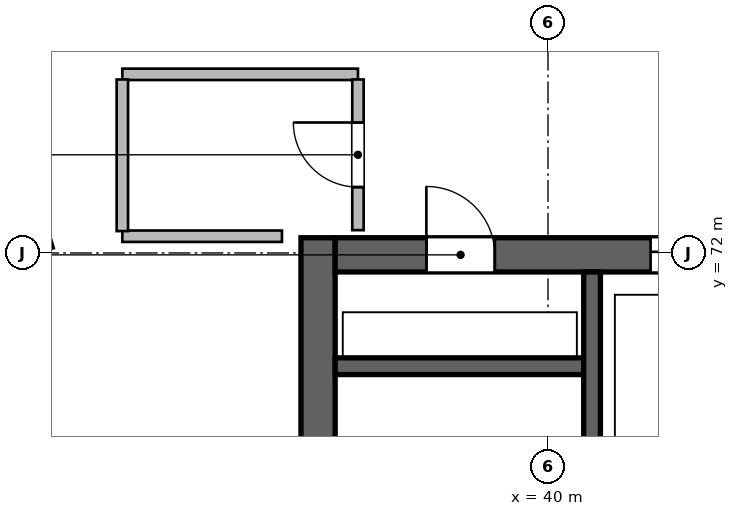
"""IFC4 building model, lengths in metres.
Left out: names, types, materials, properties, quantities, classifications, styles, units other than length and angle.
Written with IfcOpenShell. Run it as: python <this file> out.ifc"""

import sys

from ifc_helpers import new_model, si_unit, direction, frame, frame_2d, origin, origin_2d, place, context, subcontext, project, spatial, rectangle, extrude, source, transform, mapped, element, fill, save


model = new_model("IFC4")
c1 = context("Model", 3, precision=1e-05, world=origin(), true_north=direction((0.0, 1.0)))
c2 = subcontext(c1, "Body", "Model", "MODEL_VIEW")
j1 = project(units=[si_unit("LENGTHUNIT", "METRE"), si_unit("PLANEANGLEUNIT", "RADIAN")], contexts=[c1])
p1 = place(None, origin())
s1 = spatial("IfcSite", under=j1, at=p1, CompositionType="ELEMENT")
p2 = place(p1, origin())
s2 = spatial("IfcBuilding", under=s1, at=p2, CompositionType="ELEMENT")
p3 = place(p2, frame((0.0, 0.0, 189.6)))
s3 = spatial("IfcBuildingStorey", under=s2, at=p3, CompositionType="ELEMENT", Elevation=189.6)
m1 = source(origin(), c2, "Body", "SweptSolid", [
    extrude(rectangle(XDim=12.0, YDim=0.45, at=frame_2d((6.0, 0.0))), origin(), (0.0, 0.0, 1.0), 4.8),
])
p4 = place(p3, frame((36.975, 60.2, 0.0), z_axis=(0.0, 0.0, 1.0), x_axis=(0.0, 1.0, 0.0)))
e1 = element("IfcWall", 1, at=p4, inside=s3, PredefinedType="SHEAR", context=c2, shape_type="MappedRepresentation", body=[
    mapped(m1, transform((0.0, 0.0, 0.0), scale=1.0)),
])
m2 = source(origin(), c2, "Body", "SweptSolid", [
    extrude(rectangle(XDim=21.6, YDim=0.45, at=frame_2d((10.8, 0.0))), origin(), (0.0, 0.0, 1.0), 4.8),
])
p5 = place(p3, frame((37.2, 71.975, 0.0), z_axis=(0.0, 0.0, 1.0), x_axis=(1.0, 0.0, 0.0)))
e2 = element("IfcWall", 2, at=p5, inside=s3, PredefinedType="SHEAR", context=c2, shape_type="MappedRepresentation", body=[
    mapped(m2, transform((0.0, 0.0, 0.0), scale=1.0)),
])
p6 = place(p5, frame((1.2, 0.0, 0.0)))
e3 = element("IfcOpeningElement", 3, at=p6, cuts=e2, PredefinedType="OPENING", context=c2, shape_type="SweptSolid", body=[
    extrude(rectangle(XDim=0.9, YDim=2.1, at=frame_2d((0.45, 1.05))), frame((0.0, 0.235, 0.0), z_axis=(0.0, -1.0, 0.0), x_axis=(1.0, 0.0, 0.0)), (0.0, 0.0, 1.0), 0.47),
])
p7 = place(p5, frame((14.7, 0.0, 0.0)))
e4 = element("IfcOpeningElement", 4, at=p7, cuts=e2, PredefinedType="OPENING", context=c2, shape_type="SweptSolid", body=[
    extrude(rectangle(XDim=1.2, YDim=2.15, at=frame_2d((0.6, 1.075))), frame((0.0, 0.235, 0.0), z_axis=(0.0, -1.0, 0.0), x_axis=(1.0, 0.0, 0.0)), (0.0, 0.0, 1.0), 0.47),
])
p8 = place(p5, frame((4.15, 0.0, 0.0)))
e5 = element("IfcOpeningElement", 5, at=p8, cuts=e2, PredefinedType="OPENING", context=c2, shape_type="SweptSolid", body=[
    extrude(rectangle(XDim=1.3, YDim=2.15, at=frame_2d((0.65, 1.075))), frame((0.0, 0.235, 0.0), z_axis=(0.0, -1.0, 0.0), x_axis=(1.0, 0.0, 0.0)), (0.0, 0.0, 1.0), 0.47),
])
p9 = place(p5, frame((7.1, 0.0, 0.0)))
e6 = element("IfcOpeningElement", 6, at=p9, cuts=e2, PredefinedType="OPENING", context=c2, shape_type="SweptSolid", body=[
    extrude(rectangle(XDim=0.9, YDim=2.1, at=frame_2d((0.45, 1.05))), frame((0.0, 0.235, 0.0), z_axis=(0.0, -1.0, 0.0), x_axis=(1.0, 0.0, 0.0)), (0.0, 0.0, 1.0), 0.47),
])
m3 = source(origin(), c2, "Body", "SweptSolid", [
    extrude(rectangle(XDim=3.27, YDim=0.22, at=frame_2d((1.635, 0.0))), origin(), (0.0, 0.0, 1.0), 4.8),
])
p10 = place(p3, frame((37.2, 70.51, 0.0), z_axis=(0.0, 0.0, 1.0), x_axis=(1.0, 0.0, 0.0)))
e7 = element("IfcWall", 7, at=p10, inside=s3, PredefinedType="SHEAR", context=c2, shape_type="MappedRepresentation", body=[
    mapped(m3, transform((0.0, 0.0, 0.0), scale=1.0)),
])
m4 = source(origin(), c2, "Body", "SweptSolid", [
    extrude(rectangle(XDim=11.1, YDim=0.22, at=frame_2d((5.55, 0.0))), origin(), (0.0, 0.0, 1.0), 4.8),
])
p11 = place(p3, frame((40.58, 60.65, 0.0), z_axis=(0.0, 0.0, 1.0), x_axis=(0.0, 1.0, 0.0)))
e8 = element("IfcWall", 8, at=p11, inside=s3, PredefinedType="SHEAR", context=c2, shape_type="MappedRepresentation", body=[
    mapped(m4, transform((0.0, 0.0, 0.0), scale=1.0)),
])
m5 = source(origin(), c2, "Body", "SweptSolid", [
    extrude(rectangle(XDim=1.1, YDim=1.1, at=origin_2d()), origin(), (0.0, 0.0, 1.0), 4.8),
])
p12 = place(p3, frame((32.791, 72.442, 0.0), z_axis=(0.0, 0.0, 1.0), x_axis=(-0.288697611798, 0.957420330337, 0.0)))
e9 = element("IfcColumn", 9, at=p12, inside=s3, PredefinedType="COLUMN", context=c2, shape_type="MappedRepresentation", body=[
    mapped(m5, transform((0.0, 0.0, 0.0), scale=1.0)),
])
m6 = source(origin(), c2, "Body", "SweptSolid", [
    extrude(rectangle(XDim=2.1, YDim=0.15, at=frame_2d((1.05, 0.0))), origin(), (0.0, 0.0, 1.0), 4.48),
])
p13 = place(p3, frame((34.4, 72.22, 0.0), z_axis=(0.0, 0.0, 1.0), x_axis=(1.0, 0.0, 0.0)))
e10 = element("IfcWall", 10, at=p13, inside=s3, PredefinedType="PARTITIONING", context=c2, shape_type="MappedRepresentation", body=[
    mapped(m6, transform((0.0, 0.0, 0.0), scale=1.0)),
])
m7 = source(origin(), c2, "Body", "SweptSolid", [
    extrude(rectangle(XDim=3.1, YDim=0.15, at=frame_2d((1.55, 0.0))), origin(), (0.0, 0.0, 1.0), 2.424),
])
p14 = place(p3, frame((34.4, 74.35, 0.0), z_axis=(0.0, 0.0, 1.0), x_axis=(1.0, 0.0, 0.0)))
e11 = element("IfcWall", 11, at=p14, inside=s3, PredefinedType="PARTITIONING", context=c2, shape_type="MappedRepresentation", body=[
    mapped(m7, transform((0.0, 0.0, 0.0), scale=1.0)),
])
m8 = source(origin(), c2, "Body", "SweptSolid", [
    extrude(rectangle(XDim=1.995, YDim=0.15, at=frame_2d((0.998, 0.0))), origin(), (0.0, 0.0, 1.0), 4.48),
])
p15 = place(p3, frame((34.4, 72.288, 0.0), z_axis=(0.0, 0.0, 1.0), x_axis=(0.0, 1.0, 0.0)))
e12 = element("IfcWall", 12, at=p15, inside=s3, PredefinedType="PARTITIONING", context=c2, shape_type="MappedRepresentation", body=[
    mapped(m8, transform((0.0, 0.0, 0.0), scale=1.0)),
])
m9 = source(origin(), c2, "Body", "SweptSolid", [
    extrude(rectangle(XDim=1.982, YDim=0.15, at=frame_2d((0.991, 0.0))), origin(), (0.0, 0.0, 1.0), 4.48),
])
p16 = place(p3, frame((37.5, 72.3, 0.0), z_axis=(0.0, 0.0, 1.0), x_axis=(0.0, 1.0, 0.0)))
e13 = element("IfcWall", 13, at=p16, inside=s3, PredefinedType="PARTITIONING", context=c2, shape_type="MappedRepresentation", body=[
    mapped(m9, transform((0.0, 0.0, 0.0), scale=1.0)),
])
p17 = place(p16, frame((0.566, 0.0, 0.0)))
e14 = element("IfcOpeningElement", 14, at=p17, cuts=e13, PredefinedType="OPENING", context=c2, shape_type="SweptSolid", body=[
    extrude(rectangle(XDim=0.85, YDim=2.1, at=frame_2d((0.425, 1.05))), frame((0.0, 0.085, 0.0), z_axis=(0.0, -1.0, 0.0), x_axis=(1.0, 0.0, 0.0)), (0.0, 0.0, 1.0), 0.17),
])
m10 = source(origin(), c2, "Body", "SweptSolid", [
    extrude(rectangle(XDim=0.9, YDim=2.1, at=frame_2d((0.45, 1.05))), frame((0.0, 0.025, 0.0), z_axis=(0.0, -1.0, 0.0), x_axis=(1.0, 0.0, 0.0)), (0.0, 0.0, 1.0), 0.05),
])
p18 = place(p6, origin())
e15 = element("IfcDoor", 15, at=p18, inside=s3, OperationType="SINGLE_SWING_LEFT", PredefinedType="DOOR", context=c2, shape_type="MappedRepresentation", body=[
    mapped(m10, transform((0.0, 0.0, 0.0), scale=1.0)),
])
fill(e3, e15)
m11 = source(origin(), c2, "Body", "SweptSolid", [
    extrude(rectangle(XDim=1.3, YDim=2.15, at=frame_2d((0.65, 1.075))), frame((0.0, 0.025, 0.0), z_axis=(0.0, -1.0, 0.0), x_axis=(1.0, 0.0, 0.0)), (0.0, 0.0, 1.0), 0.05),
])
p19 = place(p8, origin())
e16 = element("IfcDoor", 16, at=p19, inside=s3, OperationType="DOUBLE_DOOR_SLIDING", PredefinedType="DOOR", context=c2, shape_type="MappedRepresentation", body=[
    mapped(m11, transform((0.0, 0.0, 0.0), scale=1.0)),
])
fill(e5, e16)
m12 = source(origin(), c2, "Body", "SweptSolid", [
    extrude(rectangle(XDim=0.85, YDim=2.1, at=frame_2d((0.425, 1.05))), frame((0.0, 0.025, 0.0), z_axis=(0.0, -1.0, 0.0), x_axis=(1.0, 0.0, 0.0)), (0.0, 0.0, 1.0), 0.05),
])
p20 = place(p17, origin())
e17 = element("IfcDoor", 17, at=p20, inside=s3, OperationType="SINGLE_SWING_RIGHT", PredefinedType="DOOR", context=c2, shape_type="MappedRepresentation", body=[
    mapped(m12, transform((0.0, 0.0, 0.0), scale=1.0)),
])
fill(e14, e17)
save(model, sys.argv[1])
